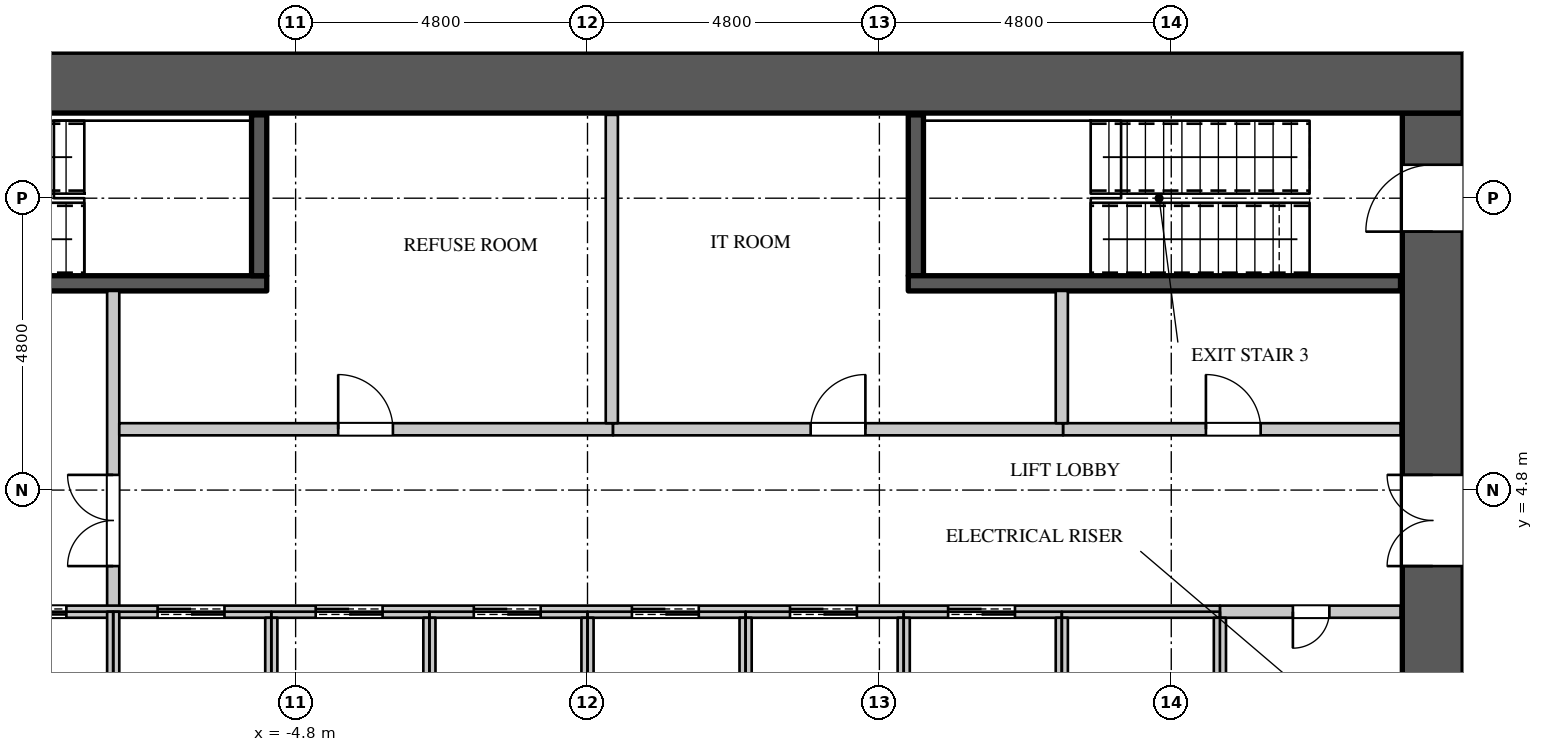
"""IFC4 building model, lengths in metres.
Left out: names, types, materials, properties, quantities, classifications, styles, units other than length and angle.
Written with IfcOpenShell. Run it as: python <this file> out.ifc"""

import sys

from ifc_helpers import new_model, si_unit, direction, frame, frame_2d, origin, place, context, subcontext, project, spatial, rectangle, extrude, element, fill, save


model = new_model("IFC4")
c1 = context("Model", 3, precision=1e-05, world=origin(), true_north=direction((0.0, 1.0)))
c2 = subcontext(c1, "Body", "Model", "MODEL_VIEW")
j1 = project(units=[si_unit("LENGTHUNIT", "METRE"), si_unit("PLANEANGLEUNIT", "RADIAN")], contexts=[c1])
p1 = place(None, origin())
s1 = spatial("IfcSite", under=j1, at=p1, CompositionType="ELEMENT")
p2 = place(p1, origin())
s2 = spatial("IfcBuilding", under=s1, at=p2, CompositionType="ELEMENT")
p3 = place(p2, frame((0.0, 0.0, 59.1)))
s3 = spatial("IfcBuildingStorey", under=s2, at=p3, CompositionType="ELEMENT", Elevation=59.1)
p4 = place(p3, frame((-14.4, 11.5, 0.0), z_axis=(0.0, 0.0, 1.0), x_axis=(1.0, 0.0, 0.0)))
e1 = element("IfcWall", 1, at=p4, inside=s3, PredefinedType="SHEAR", context=c2, shape_type="SweptSolid", body=[
    extrude(rectangle(XDim=28.8, YDim=1.0, at=frame_2d((14.4, 0.0))), origin(), (0.0, 0.0, 1.0), 4.2),
])
p5 = place(p3, frame((13.9, -11.0, 0.0), z_axis=(0.0, 0.0, 1.0), x_axis=(0.0, 1.0, 0.0)))
e2 = element("IfcWall", 2, at=p5, inside=s3, PredefinedType="SHEAR", context=c2, shape_type="SweptSolid", body=[
    extrude(rectangle(XDim=22.0, YDim=1.0, at=frame_2d((11.0, 0.0))), origin(), (0.0, 0.0, 1.0), 4.2),
])
p6 = place(p5, frame((20.05, 0.0, 0.0)))
e3 = element("IfcOpeningElement", 3, at=p6, cuts=e2, PredefinedType="OPENING", context=c2, shape_type="SweptSolid", body=[
    extrude(rectangle(XDim=1.1, YDim=2.2, at=frame_2d((0.55, 1.1))), frame((0.0, 0.51, 0.0), z_axis=(0.0, -1.0, 0.0), x_axis=(1.0, 0.0, 0.0)), (0.0, 0.0, 1.0), 1.02),
])
p7 = place(p5, frame((0.85, 0.0, 0.0)))
e4 = element("IfcOpeningElement", 4, at=p7, cuts=e2, PredefinedType="OPENING", context=c2, shape_type="SweptSolid", body=[
    extrude(rectangle(XDim=1.1, YDim=2.2, at=frame_2d((0.55, 1.1))), frame((0.0, 0.51, 0.0), z_axis=(0.0, -1.0, 0.0), x_axis=(1.0, 0.0, 0.0)), (0.0, 0.0, 1.0), 1.02),
])
p8 = place(p5, frame((14.55, 0.0, 0.0)))
e5 = element("IfcOpeningElement", 5, at=p8, cuts=e2, PredefinedType="OPENING", context=c2, shape_type="SweptSolid", body=[
    extrude(rectangle(XDim=1.5, YDim=2.4, at=frame_2d((0.75, 1.2))), frame((0.0, 0.51, 0.0), z_axis=(0.0, -1.0, 0.0), x_axis=(1.0, 0.0, 0.0)), (0.0, 0.0, 1.0), 1.02),
])
p9 = place(p5, frame((5.95, 0.0, 0.0)))
e6 = element("IfcOpeningElement", 6, at=p9, cuts=e2, PredefinedType="OPENING", context=c2, shape_type="SweptSolid", body=[
    extrude(rectangle(XDim=1.5, YDim=2.4, at=frame_2d((0.75, 1.2))), frame((0.0, 0.51, 0.0), z_axis=(0.0, -1.0, 0.0), x_axis=(1.0, 0.0, 0.0)), (0.0, 0.0, 1.0), 1.02),
])
p10 = place(p3, frame((-7.8, 2.8, 0.0), z_axis=(0.0, 0.0, 1.0), x_axis=(0.0, 1.0, 0.0)))
e7 = element("IfcWall", 7, at=p10, inside=s3, PredefinedType="PARTITIONING", context=c2, shape_type="SweptSolid", body=[
    extrude(rectangle(XDim=5.275, YDim=0.2, at=frame_2d((2.637, 0.0))), origin(), (0.0, 0.0, 1.0), 3.95),
])
p11 = place(p10, frame((0.75, 0.0, 0.0)))
e8 = element("IfcOpeningElement", 8, at=p11, cuts=e7, PredefinedType="OPENING", context=c2, shape_type="SweptSolid", body=[
    extrude(rectangle(XDim=1.5, YDim=2.4, at=frame_2d((0.75, 1.2))), frame((0.0, 0.11, 0.0), z_axis=(0.0, -1.0, 0.0), x_axis=(1.0, 0.0, 0.0)), (0.0, 0.0, 1.0), 0.22),
])
p12 = place(p3, frame((-7.7, 5.8, 0.0), z_axis=(0.0, 0.0, 1.0), x_axis=(1.0, 0.0, 0.0)))
e9 = element("IfcWall", 9, at=p12, inside=s3, PredefinedType="PARTITIONING", context=c2, shape_type="SweptSolid", body=[
    extrude(rectangle(XDim=8.12, YDim=0.2, at=frame_2d((4.06, 0.0))), origin(), (0.0, 0.0, 1.0), 3.95),
])
p13 = place(p12, frame((3.6, 0.0, 0.0)))
e10 = element("IfcOpeningElement", 10, at=p13, cuts=e9, PredefinedType="OPENING", context=c2, shape_type="SweptSolid", body=[
    extrude(rectangle(XDim=0.9, YDim=2.2, at=frame_2d((0.45, 1.1))), frame((0.0, 0.11, 0.0), z_axis=(0.0, -1.0, 0.0), x_axis=(1.0, 0.0, 0.0)), (0.0, 0.0, 1.0), 0.22),
])
p14 = place(p3, frame((7.82, 5.8, 0.0), z_axis=(0.0, 0.0, 1.0), x_axis=(1.0, 0.0, 0.0)))
e11 = element("IfcWall", 11, at=p14, inside=s3, PredefinedType="PARTITIONING", context=c2, shape_type="SweptSolid", body=[
    extrude(rectangle(XDim=5.55, YDim=0.2, at=frame_2d((2.775, 0.0))), origin(), (0.0, 0.0, 1.0), 3.95),
])
p15 = place(p14, frame((2.35, 0.0, 0.0)))
e12 = element("IfcOpeningElement", 12, at=p15, cuts=e11, PredefinedType="OPENING", context=c2, shape_type="SweptSolid", body=[
    extrude(rectangle(XDim=0.9, YDim=2.2, at=frame_2d((0.45, 1.1))), frame((0.0, 0.11, 0.0), z_axis=(0.0, -1.0, 0.0), x_axis=(1.0, 0.0, 0.0)), (0.0, 0.0, 1.0), 0.22),
])
p16 = place(p3, frame((0.42, 5.8, 0.0), z_axis=(0.0, 0.0, 1.0), x_axis=(1.0, 0.0, 0.0)))
e13 = element("IfcWall", 13, at=p16, inside=s3, PredefinedType="PARTITIONING", context=c2, shape_type="SweptSolid", body=[
    extrude(rectangle(XDim=7.4, YDim=0.2, at=frame_2d((3.7, 0.0))), origin(), (0.0, 0.0, 1.0), 3.95),
])
p17 = place(p16, frame((3.25, 0.0, 0.0)))
e14 = element("IfcOpeningElement", 14, at=p17, cuts=e13, PredefinedType="OPENING", context=c2, shape_type="SweptSolid", body=[
    extrude(rectangle(XDim=0.9, YDim=2.2, at=frame_2d((0.45, 1.1))), frame((0.0, 0.11, 0.0), z_axis=(0.0, -1.0, 0.0), x_axis=(1.0, 0.0, 0.0)), (0.0, 0.0, 1.0), 0.22),
])
p18 = place(p3, frame((0.4, 5.9, 0.0), z_axis=(0.0, 0.0, 1.0), x_axis=(0.0, 1.0, 0.0)))
e15 = element("IfcWall", 15, at=p18, inside=s3, PredefinedType="PARTITIONING", context=c2, shape_type="SweptSolid", body=[
    extrude(rectangle(XDim=5.07, YDim=0.2, at=frame_2d((2.535, 0.0))), origin(), (0.0, 0.0, 1.0), 3.95),
])
p19 = place(p3, frame((7.8, 5.9, 0.0), z_axis=(0.0, 0.0, 1.0), x_axis=(0.0, 1.0, 0.0)))
e16 = element("IfcWall", 16, at=p19, inside=s3, PredefinedType="PARTITIONING", context=c2, shape_type="SweptSolid", body=[
    extrude(rectangle(XDim=2.175, YDim=0.2, at=frame_2d((1.087, 0.0))), origin(), (0.0, 0.0, 1.0), 3.95),
])
p20 = place(p3, frame((10.4, 2.8, 0.0), z_axis=(0.0, 0.0, 1.0), x_axis=(1.0, 0.0, 0.0)))
e17 = element("IfcWall", 17, at=p20, inside=s3, PredefinedType="PARTITIONING", context=c2, shape_type="SweptSolid", body=[
    extrude(rectangle(XDim=2.97, YDim=0.2, at=frame_2d((1.485, 0.0))), origin(), (0.0, 0.0, 1.0), 3.95),
])
p21 = place(p20, frame((1.2, 0.0, 0.0)))
e18 = element("IfcOpeningElement", 18, at=p21, cuts=e17, PredefinedType="OPENING", context=c2, shape_type="SweptSolid", body=[
    extrude(rectangle(XDim=0.6, YDim=2.0, at=frame_2d((0.3, 1.0))), frame((0.0, 0.11, 0.0), z_axis=(0.0, -1.0, 0.0), x_axis=(1.0, 0.0, 0.0)), (0.0, 0.0, 1.0), 0.22),
])
p22 = place(p3, frame((-13.37, 2.8, 0.0), z_axis=(0.0, 0.0, 1.0), x_axis=(1.0, 0.0, 0.0)))
e19 = element("IfcWall", 19, at=p22, inside=s3, PredefinedType="PARTITIONING", context=c2, shape_type="SweptSolid", body=[
    extrude(rectangle(XDim=23.77, YDim=0.2, at=frame_2d((11.885, 0.0))), origin(), (0.0, 0.0, 1.0), 3.95),
])
p23 = place(p22, frame((0.9, 0.0, 0.0)))
e20 = element("IfcOpeningElement", 20, at=p23, cuts=e19, PredefinedType="OPENING", context=c2, shape_type="SweptSolid", body=[
    extrude(rectangle(XDim=1.1, YDim=2.2, at=frame_2d((0.55, 1.1))), frame((0.0, 0.11, 0.0), z_axis=(0.0, -1.0, 0.0), x_axis=(1.0, 0.0, 0.0)), (0.0, 0.0, 1.0), 0.22),
])
p24 = place(p22, frame((3.7, 0.0, 0.0)))
e21 = element("IfcOpeningElement", 21, at=p24, cuts=e19, PredefinedType="OPENING", context=c2, shape_type="SweptSolid", body=[
    extrude(rectangle(XDim=1.1, YDim=2.2, at=frame_2d((0.55, 1.1))), frame((0.0, 0.11, 0.0), z_axis=(0.0, -1.0, 0.0), x_axis=(1.0, 0.0, 0.0)), (0.0, 0.0, 1.0), 0.22),
])
p25 = place(p22, frame((6.3, 0.0, 0.0)))
e22 = element("IfcOpeningElement", 22, at=p25, cuts=e19, PredefinedType="OPENING", context=c2, shape_type="SweptSolid", body=[
    extrude(rectangle(XDim=1.1, YDim=2.2, at=frame_2d((0.55, 1.1))), frame((0.0, 0.11, 0.0), z_axis=(0.0, -1.0, 0.0), x_axis=(1.0, 0.0, 0.0)), (0.0, 0.0, 1.0), 0.22),
])
p26 = place(p22, frame((8.9, 0.0, 0.0)))
e23 = element("IfcOpeningElement", 23, at=p26, cuts=e19, PredefinedType="OPENING", context=c2, shape_type="SweptSolid", body=[
    extrude(rectangle(XDim=1.1, YDim=2.2, at=frame_2d((0.55, 1.1))), frame((0.0, 0.11, 0.0), z_axis=(0.0, -1.0, 0.0), x_axis=(1.0, 0.0, 0.0)), (0.0, 0.0, 1.0), 0.22),
])
p27 = place(p22, frame((11.5, 0.0, 0.0)))
e24 = element("IfcOpeningElement", 24, at=p27, cuts=e19, PredefinedType="OPENING", context=c2, shape_type="SweptSolid", body=[
    extrude(rectangle(XDim=1.1, YDim=2.2, at=frame_2d((0.55, 1.1))), frame((0.0, 0.11, 0.0), z_axis=(0.0, -1.0, 0.0), x_axis=(1.0, 0.0, 0.0)), (0.0, 0.0, 1.0), 0.22),
])
p28 = place(p22, frame((14.1, 0.0, 0.0)))
e25 = element("IfcOpeningElement", 25, at=p28, cuts=e19, PredefinedType="OPENING", context=c2, shape_type="SweptSolid", body=[
    extrude(rectangle(XDim=1.1, YDim=2.2, at=frame_2d((0.55, 1.1))), frame((0.0, 0.11, 0.0), z_axis=(0.0, -1.0, 0.0), x_axis=(1.0, 0.0, 0.0)), (0.0, 0.0, 1.0), 0.22),
])
p29 = place(p22, frame((16.7, 0.0, 0.0)))
e26 = element("IfcOpeningElement", 26, at=p29, cuts=e19, PredefinedType="OPENING", context=c2, shape_type="SweptSolid", body=[
    extrude(rectangle(XDim=1.1, YDim=2.2, at=frame_2d((0.55, 1.1))), frame((0.0, 0.11, 0.0), z_axis=(0.0, -1.0, 0.0), x_axis=(1.0, 0.0, 0.0)), (0.0, 0.0, 1.0), 0.22),
])
p30 = place(p22, frame((19.3, 0.0, 0.0)))
e27 = element("IfcOpeningElement", 27, at=p30, cuts=e19, PredefinedType="OPENING", context=c2, shape_type="SweptSolid", body=[
    extrude(rectangle(XDim=1.1, YDim=2.2, at=frame_2d((0.55, 1.1))), frame((0.0, 0.11, 0.0), z_axis=(0.0, -1.0, 0.0), x_axis=(1.0, 0.0, 0.0)), (0.0, 0.0, 1.0), 0.22),
])
p31 = place(p3, frame((-7.8, 0.0, 0.0), z_axis=(0.0, 0.0, 1.0), x_axis=(0.0, 1.0, 0.0)))
e28 = element("IfcWall", 28, at=p31, inside=s3, PredefinedType="PARTITIONING", context=c2, shape_type="SweptSolid", body=[
    extrude(rectangle(XDim=2.8, YDim=0.2, at=frame_2d((1.4, 0.0))), origin(), (0.0, 0.0, 1.0), 3.95),
])
for number, where, z_axis, x_axis in (
    (29, (-5.2, 0.1, 0.0), (0.0, 0.0, 1.0), (0.0, 1.0, 0.0)),
    (30, (-2.6, 0.1, 0.0), (0.0, 0.0, 1.0), (0.0, 1.0, 0.0)),
    (31, (0.0, 0.1, 0.0), (0.0, 0.0, 1.0), (0.0, 1.0, 0.0)),
    (32, (2.6, 0.1, 0.0), (0.0, 0.0, 1.0), (0.0, 1.0, 0.0)),
    (33, (5.2, 0.1, 0.0), (0.0, 0.0, 1.0), (0.0, 1.0, 0.0)),
):
    element("IfcWall", number, at=place(p3, frame(where, z_axis=z_axis, x_axis=x_axis)), inside=s3, PredefinedType="PARTITIONING", context=c2, shape_type="SweptSolid", body=[
        extrude(rectangle(XDim=2.6, YDim=0.2, at=frame_2d((1.3, 0.0))), origin(), (0.0, 0.0, 1.0), 3.95),
    ])
p32 = place(p3, frame((7.8, 0.0, 0.0), z_axis=(0.0, 0.0, 1.0), x_axis=(0.0, 1.0, 0.0)))
e34 = element("IfcWall", 34, at=p32, inside=s3, PredefinedType="PARTITIONING", context=c2, shape_type="SweptSolid", body=[
    extrude(rectangle(XDim=2.7, YDim=0.2, at=frame_2d((1.35, 0.0))), origin(), (0.0, 0.0, 1.0), 3.95),
])
p33 = place(p3, frame((10.4, -2.7, 0.0), z_axis=(0.0, 0.0, 1.0), x_axis=(0.0, 1.0, 0.0)))
e35 = element("IfcWall", 35, at=p33, inside=s3, PredefinedType="PARTITIONING", context=c2, shape_type="SweptSolid", body=[
    extrude(rectangle(XDim=5.4, YDim=0.2, at=frame_2d((2.7, 0.0))), origin(), (0.0, 0.0, 1.0), 3.95),
])
p34 = place(p3, frame((-13.37, 8.2, 0.0), z_axis=(0.0, 0.0, 1.0), x_axis=(1.0, 0.0, 0.0)))
e36 = element("IfcWall", 36, at=p34, inside=s3, PredefinedType="SHEAR", context=c2, shape_type="SweptSolid", body=[
    extrude(rectangle(XDim=8.095, YDim=0.25, at=frame_2d((4.048, 0.0))), origin(), (0.0, 0.0, 1.0), 3.95),
])
p35 = place(p34, frame((0.15, 0.0, 0.0)))
e37 = element("IfcOpeningElement", 37, at=p35, cuts=e36, PredefinedType="OPENING", context=c2, shape_type="SweptSolid", body=[
    extrude(rectangle(XDim=1.1, YDim=2.2, at=frame_2d((0.55, 1.1))), frame((0.0, 0.135, 0.0), z_axis=(0.0, -1.0, 0.0), x_axis=(1.0, 0.0, 0.0)), (0.0, 0.0, 1.0), 0.27),
])
for number, where, z_axis, x_axis in (
    (38, (-5.4, 8.325, 0.0), (0.0, 0.0, 1.0), (0.0, 1.0, 0.0)),
    (39, (5.4, 8.325, 0.0), (0.0, 0.0, 1.0), (0.0, 1.0, 0.0)),
):
    element("IfcWall", number, at=place(p3, frame(where, z_axis=z_axis, x_axis=x_axis)), inside=s3, PredefinedType="SHEAR", context=c2, shape_type="SweptSolid", body=[
        extrude(rectangle(XDim=2.645, YDim=0.25, at=frame_2d((1.323, 0.0))), origin(), (0.0, 0.0, 1.0), 3.95),
    ])
p36 = place(p3, frame((5.275, 8.2, 0.0), z_axis=(0.0, 0.0, 1.0), x_axis=(1.0, 0.0, 0.0)))
e40 = element("IfcWall", 40, at=p36, inside=s3, PredefinedType="SHEAR", context=c2, shape_type="SweptSolid", body=[
    extrude(rectangle(XDim=8.095, YDim=0.25, at=frame_2d((4.048, 0.0))), origin(), (0.0, 0.0, 1.0), 3.95),
])
p37 = place(p21, origin())
e41 = element("IfcDoor", 41, at=p37, inside=s3, OperationType="SINGLE_SWING_RIGHT", PredefinedType="DOOR", context=c2, shape_type="SweptSolid", body=[
    extrude(rectangle(XDim=0.6, YDim=2.0, at=frame_2d((0.3, 1.0))), frame((0.0, 0.025, 0.0), z_axis=(0.0, -1.0, 0.0), x_axis=(1.0, 0.0, 0.0)), (0.0, 0.0, 1.0), 0.05),
])
fill(e18, e41)
p38 = place(p13, origin())
e42 = element("IfcDoor", 42, at=p38, inside=s3, OperationType="SINGLE_SWING_LEFT", PredefinedType="DOOR", context=c2, shape_type="SweptSolid", body=[
    extrude(rectangle(XDim=0.9, YDim=2.2, at=frame_2d((0.45, 1.1))), frame((0.0, 0.025, 0.0), z_axis=(0.0, -1.0, 0.0), x_axis=(1.0, 0.0, 0.0)), (0.0, 0.0, 1.0), 0.05),
])
fill(e10, e42)
p39 = place(p17, origin())
e43 = element("IfcDoor", 43, at=p39, inside=s3, OperationType="SINGLE_SWING_RIGHT", PredefinedType="DOOR", context=c2, shape_type="SweptSolid", body=[
    extrude(rectangle(XDim=0.9, YDim=2.2, at=frame_2d((0.45, 1.1))), frame((0.0, 0.025, 0.0), z_axis=(0.0, -1.0, 0.0), x_axis=(1.0, 0.0, 0.0)), (0.0, 0.0, 1.0), 0.05),
])
fill(e14, e43)
p40 = place(p15, origin())
e44 = element("IfcDoor", 44, at=p40, inside=s3, OperationType="SINGLE_SWING_LEFT", PredefinedType="DOOR", context=c2, shape_type="SweptSolid", body=[
    extrude(rectangle(XDim=0.9, YDim=2.2, at=frame_2d((0.45, 1.1))), frame((0.0, 0.025, 0.0), z_axis=(0.0, -1.0, 0.0), x_axis=(1.0, 0.0, 0.0)), (0.0, 0.0, 1.0), 0.05),
])
fill(e12, e44)
p41 = place(p24, origin())
e45 = element("IfcDoor", 45, at=p41, inside=s3, OperationType="DOUBLE_DOOR_SLIDING", PredefinedType="DOOR", context=c2, shape_type="SweptSolid", body=[
    extrude(rectangle(XDim=1.1, YDim=2.2, at=frame_2d((0.55, 1.1))), frame((0.0, 0.025, 0.0), z_axis=(0.0, -1.0, 0.0), x_axis=(1.0, 0.0, 0.0)), (0.0, 0.0, 1.0), 0.05),
])
fill(e21, e45)
p42 = place(p25, origin())
e46 = element("IfcDoor", 46, at=p42, inside=s3, OperationType="DOUBLE_DOOR_SLIDING", PredefinedType="DOOR", context=c2, shape_type="SweptSolid", body=[
    extrude(rectangle(XDim=1.1, YDim=2.2, at=frame_2d((0.55, 1.1))), frame((0.0, 0.025, 0.0), z_axis=(0.0, -1.0, 0.0), x_axis=(1.0, 0.0, 0.0)), (0.0, 0.0, 1.0), 0.05),
])
fill(e22, e46)
p43 = place(p26, origin())
e47 = element("IfcDoor", 47, at=p43, inside=s3, OperationType="DOUBLE_DOOR_SLIDING", PredefinedType="DOOR", context=c2, shape_type="SweptSolid", body=[
    extrude(rectangle(XDim=1.1, YDim=2.2, at=frame_2d((0.55, 1.1))), frame((0.0, 0.025, 0.0), z_axis=(0.0, -1.0, 0.0), x_axis=(1.0, 0.0, 0.0)), (0.0, 0.0, 1.0), 0.05),
])
fill(e23, e47)
p44 = place(p27, origin())
e48 = element("IfcDoor", 48, at=p44, inside=s3, OperationType="DOUBLE_DOOR_SLIDING", PredefinedType="DOOR", context=c2, shape_type="SweptSolid", body=[
    extrude(rectangle(XDim=1.1, YDim=2.2, at=frame_2d((0.55, 1.1))), frame((0.0, 0.025, 0.0), z_axis=(0.0, -1.0, 0.0), x_axis=(1.0, 0.0, 0.0)), (0.0, 0.0, 1.0), 0.05),
])
fill(e24, e48)
p45 = place(p28, origin())
e49 = element("IfcDoor", 49, at=p45, inside=s3, OperationType="DOUBLE_DOOR_SLIDING", PredefinedType="DOOR", context=c2, shape_type="SweptSolid", body=[
    extrude(rectangle(XDim=1.1, YDim=2.2, at=frame_2d((0.55, 1.1))), frame((0.0, 0.025, 0.0), z_axis=(0.0, -1.0, 0.0), x_axis=(1.0, 0.0, 0.0)), (0.0, 0.0, 1.0), 0.05),
])
fill(e25, e49)
p46 = place(p29, origin())
e50 = element("IfcDoor", 50, at=p46, inside=s3, OperationType="DOUBLE_DOOR_SLIDING", PredefinedType="DOOR", context=c2, shape_type="SweptSolid", body=[
    extrude(rectangle(XDim=1.1, YDim=2.2, at=frame_2d((0.55, 1.1))), frame((0.0, 0.025, 0.0), z_axis=(0.0, -1.0, 0.0), x_axis=(1.0, 0.0, 0.0)), (0.0, 0.0, 1.0), 0.05),
])
fill(e26, e50)
p47 = place(p30, origin())
e51 = element("IfcDoor", 51, at=p47, inside=s3, OperationType="DOUBLE_DOOR_SLIDING", PredefinedType="DOOR", context=c2, shape_type="SweptSolid", body=[
    extrude(rectangle(XDim=1.1, YDim=2.2, at=frame_2d((0.55, 1.1))), frame((0.0, 0.025, 0.0), z_axis=(0.0, -1.0, 0.0), x_axis=(1.0, 0.0, 0.0)), (0.0, 0.0, 1.0), 0.05),
])
fill(e27, e51)
p48 = place(p11, origin())
e52 = element("IfcDoor", 52, at=p48, inside=s3, OperationType="DOUBLE_DOOR_SINGLE_SWING", PredefinedType="DOOR", context=c2, shape_type="SweptSolid", body=[
    extrude(rectangle(XDim=1.5, YDim=2.4, at=frame_2d((0.75, 1.2))), frame((0.0, 0.025, 0.0), z_axis=(0.0, -1.0, 0.0), x_axis=(1.0, 0.0, 0.0)), (0.0, 0.0, 1.0), 0.05),
])
fill(e8, e52)
p49 = place(p6, origin())
e53 = element("IfcDoor", 53, at=p49, inside=s3, OperationType="SINGLE_SWING_LEFT", PredefinedType="DOOR", context=c2, shape_type="SweptSolid", body=[
    extrude(rectangle(XDim=1.1, YDim=2.2, at=frame_2d((0.55, 1.1))), frame((0.0, 0.495, 0.0), z_axis=(0.0, -1.0, 0.0), x_axis=(1.0, 0.0, 0.0)), (0.0, 0.0, 1.0), 0.05),
])
fill(e3, e53)
p50 = place(p8, origin())
e54 = element("IfcDoor", 54, at=p50, inside=s3, OperationType="DOUBLE_DOOR_SINGLE_SWING", PredefinedType="DOOR", context=c2, shape_type="SweptSolid", body=[
    extrude(rectangle(XDim=1.5, YDim=2.4, at=frame_2d((0.75, 1.2))), frame((0.0, 0.495, 0.0), z_axis=(0.0, -1.0, 0.0), x_axis=(1.0, 0.0, 0.0)), (0.0, 0.0, 1.0), 0.05),
])
fill(e5, e54)
save(model, sys.argv[1])
